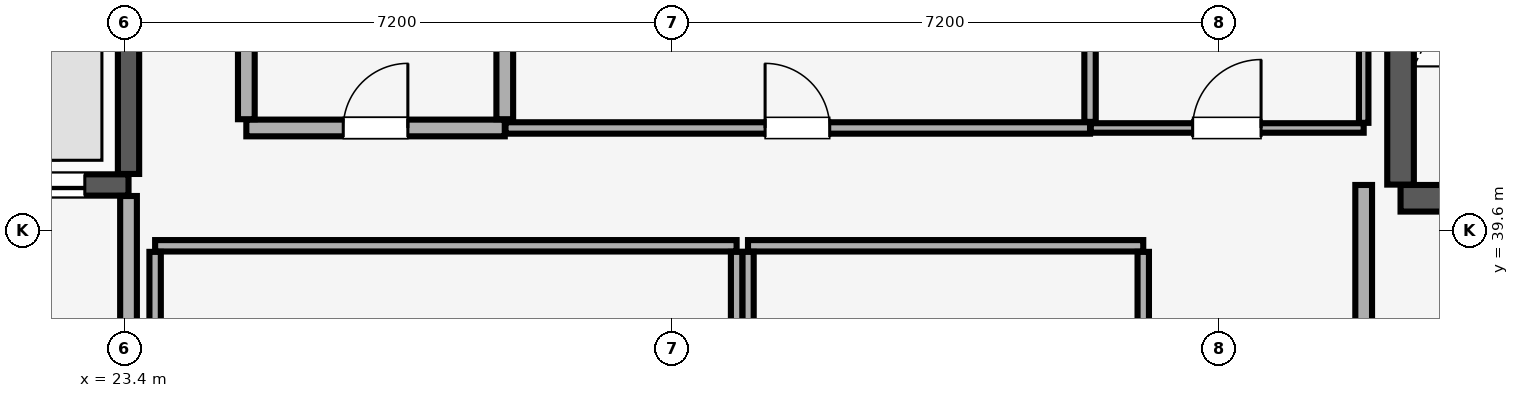
"""IFC4 building model, lengths in metres.
Left out: names, types, materials, properties, quantities, classifications, styles, units other than length and angle.
Written with IfcOpenShell. Run it as: python <this file> out.ifc"""

import sys

from ifc_helpers import new_model, si_unit, direction, frame, frame_2d, origin, place, context, subcontext, project, spatial, rectangle, extrude, element, fill, save


model = new_model("IFC4")
c1 = context("Model", 3, precision=1e-05, world=origin(), true_north=direction((0.0, 1.0)))
c2 = subcontext(c1, "Body", "Model", "MODEL_VIEW")
j1 = project(units=[si_unit("LENGTHUNIT", "METRE"), si_unit("PLANEANGLEUNIT", "RADIAN")], contexts=[c1])
p1 = place(None, origin())
s1 = spatial("IfcSite", under=j1, at=p1, CompositionType="ELEMENT")
p2 = place(p1, origin())
s2 = spatial("IfcBuilding", under=s1, at=p2, CompositionType="ELEMENT")
p3 = place(p2, frame((0.0, 0.0, 310.7)))
s3 = spatial("IfcBuildingStorey", under=s2, at=p3, CompositionType="ELEMENT", Elevation=310.7)
p4 = place(p3, frame((40.185, 40.025, 0.0), z_axis=(0.0, 0.0, 1.0), x_axis=(1.0, 0.0, 0.0)))
e1 = element("IfcWall", 1, at=p4, inside=s3, PredefinedType="SHEAR", context=c2, shape_type="SweptSolid", body=[
    extrude(rectangle(XDim=3.63, YDim=0.35, at=frame_2d((1.815, 0.0))), origin(), (0.0, 0.0, 1.0), 7.5),
])
p5 = place(p4, frame((1.24, 0.0, 0.0)))
e2 = element("IfcOpeningElement", 2, at=p5, cuts=e1, PredefinedType="OPENING", context=c2, shape_type="SweptSolid", body=[
    extrude(rectangle(XDim=1.15, YDim=2.15, at=frame_2d((0.575, 1.075))), frame((0.0, 0.185, 0.0), z_axis=(0.0, -1.0, 0.0), x_axis=(1.0, 0.0, 0.0)), (0.0, 0.0, 1.0), 0.37),
])
p6 = place(p3, frame((40.185, 40.205, 0.0), z_axis=(0.0, 0.0, 1.0), x_axis=(0.0, 1.0, 0.0)))
e3 = element("IfcWall", 3, at=p6, inside=s3, PredefinedType="SHEAR", context=c2, shape_type="SweptSolid", body=[
    extrude(rectangle(XDim=8.09, YDim=0.35, at=frame_2d((4.045, 0.0))), origin(), (0.0, 0.0, 1.0), 7.5),
])
p7 = place(p3, frame((21.035, 40.2, 0.0), z_axis=(0.0, 0.0, 1.0), x_axis=(1.0, 0.0, 0.0)))
e4 = element("IfcWall", 4, at=p7, inside=s3, PredefinedType="SHEAR", context=c2, shape_type="SweptSolid", body=[
    extrude(rectangle(XDim=2.415, YDim=0.28, at=frame_2d((1.208, 0.0))), origin(), (0.0, 0.0, 1.0), 7.5),
])
p8 = place(p7, frame((0.54, 0.0, 0.0)))
e5 = element("IfcOpeningElement", 5, at=p8, cuts=e4, PredefinedType="OPENING", context=c2, shape_type="SweptSolid", body=[
    extrude(rectangle(XDim=1.3, YDim=2.3, at=frame_2d((0.65, 1.15))), frame((0.0, 0.15, 0.0), z_axis=(0.0, -1.0, 0.0), x_axis=(1.0, 0.0, 0.0)), (0.0, 0.0, 1.0), 0.3),
])
p9 = place(p3, frame((23.45, 40.345, 0.0), z_axis=(0.0, 0.0, 1.0), x_axis=(0.0, 1.0, 0.0)))
e6 = element("IfcWall", 6, at=p9, inside=s3, PredefinedType="SHEAR", context=c2, shape_type="SweptSolid", body=[
    extrude(rectangle(XDim=2.81, YDim=0.28, at=frame_2d((1.405, 0.0))), origin(), (0.0, 0.0, 1.0), 7.5),
])
p10 = place(p3, frame((23.45, 34.415, 0.0), z_axis=(0.0, 0.0, 1.0), x_axis=(0.0, 1.0, 0.0)))
e7 = element("IfcWall", 7, at=p10, inside=s3, PredefinedType="PARTITIONING", context=c2, shape_type="SweptSolid", body=[
    extrude(rectangle(XDim=5.64, YDim=0.22, at=frame_2d((2.82, 0.0))), origin(), (0.0, 0.0, 1.0), 7.5),
])
p11 = place(p3, frame((39.7, 34.415, 0.0), z_axis=(0.0, 0.0, 1.0), x_axis=(0.0, 1.0, 0.0)))
e8 = element("IfcWall", 8, at=p11, inside=s3, PredefinedType="PARTITIONING", context=c2, shape_type="SweptSolid", body=[
    extrude(rectangle(XDim=5.785, YDim=0.22, at=frame_2d((2.893, 0.0))), origin(), (0.0, 0.0, 1.0), 7.5),
])
p12 = place(p3, frame((31.6, 39.4, 0.0), z_axis=(0.0, 0.0, 1.0), x_axis=(1.0, 0.0, 0.0)))
e9 = element("IfcWall", 9, at=p12, inside=s3, PredefinedType="PARTITIONING", context=c2, shape_type="SweptSolid", body=[
    extrude(rectangle(XDim=5.2, YDim=0.15, at=frame_2d((2.6, 0.0))), origin(), (0.0, 0.0, 1.0), 7.5),
])
for number, where, z_axis, x_axis in (
    (10, (31.6, 34.38, 0.0), (0.0, 0.0, 1.0), (0.0, 1.0, 0.0)),
    (11, (36.8, 34.38, 0.0), (0.0, 0.0, 1.0), (0.0, 1.0, 0.0)),
):
    element("IfcWall", number, at=place(p3, frame(where, z_axis=z_axis, x_axis=x_axis)), inside=s3, PredefinedType="PARTITIONING", context=c2, shape_type="SweptSolid", body=[
        extrude(rectangle(XDim=4.94, YDim=0.15, at=frame_2d((2.47, 0.0))), origin(), (0.0, 0.0, 1.0), 7.5),
    ])
p13 = place(p3, frame((23.8, 39.4, 0.0), z_axis=(0.0, 0.0, 1.0), x_axis=(1.0, 0.0, 0.0)))
e12 = element("IfcWall", 12, at=p13, inside=s3, PredefinedType="PARTITIONING", context=c2, shape_type="SweptSolid", body=[
    extrude(rectangle(XDim=7.65, YDim=0.15, at=frame_2d((3.825, 0.0))), origin(), (0.0, 0.0, 1.0), 7.5),
])
for number, where, z_axis, x_axis in (
    (13, (23.8, 34.38, 0.0), (0.0, 0.0, 1.0), (0.0, 1.0, 0.0)),
    (14, (31.45, 34.38, 0.0), (0.0, 0.0, 1.0), (0.0, 1.0, 0.0)),
):
    element("IfcWall", number, at=place(p3, frame(where, z_axis=z_axis, x_axis=x_axis)), inside=s3, PredefinedType="PARTITIONING", context=c2, shape_type="SweptSolid", body=[
        extrude(rectangle(XDim=4.94, YDim=0.15, at=frame_2d((2.47, 0.0))), origin(), (0.0, 0.0, 1.0), 7.5),
    ])
p14 = place(p3, frame((25.0, 40.95, 0.0), z_axis=(0.0, 0.0, 1.0), x_axis=(1.0, 0.0, 0.0)))
e15 = element("IfcWall", 15, at=p14, inside=s3, PredefinedType="PARTITIONING", context=c2, shape_type="SweptSolid", body=[
    extrude(rectangle(XDim=3.4, YDim=0.22, at=frame_2d((1.7, 0.0))), origin(), (0.0, 0.0, 1.0), 7.5),
])
p15 = place(p14, frame((1.275, 0.0, 0.0)))
e16 = element("IfcOpeningElement", 16, at=p15, cuts=e15, PredefinedType="OPENING", context=c2, shape_type="SweptSolid", body=[
    extrude(rectangle(XDim=0.85, YDim=2.1, at=frame_2d((0.425, 1.05))), frame((0.0, 0.12, 0.0), z_axis=(0.0, -1.0, 0.0), x_axis=(1.0, 0.0, 0.0)), (0.0, 0.0, 1.0), 0.24),
])
for number, where, z_axis, x_axis in (
    (17, (25.0, 41.065, 0.0), (0.0, 0.0, 1.0), (0.0, 1.0, 0.0)),
    (18, (28.4, 41.065, 0.0), (0.0, 0.0, 1.0), (0.0, 1.0, 0.0)),
):
    element("IfcWall", number, at=place(p3, frame(where, z_axis=z_axis, x_axis=x_axis)), inside=s3, PredefinedType="PARTITIONING", context=c2, shape_type="SweptSolid", body=[
        extrude(rectangle(XDim=7.785, YDim=0.22, at=frame_2d((3.893, 0.0))), origin(), (0.0, 0.0, 1.0), 7.5),
    ])
p16 = place(p3, frame((28.41, 40.95, 0.0), z_axis=(0.0, 0.0, 1.0), x_axis=(1.0, 0.0, 0.0)))
e19 = element("IfcWall", 19, at=p16, inside=s3, PredefinedType="PARTITIONING", context=c2, shape_type="SweptSolid", body=[
    extrude(rectangle(XDim=7.69, YDim=0.15, at=frame_2d((3.845, 0.0))), origin(), (0.0, 0.0, 1.0), 7.5),
])
p17 = place(p16, frame((3.415, 0.0, 0.0)))
e20 = element("IfcOpeningElement", 20, at=p17, cuts=e19, PredefinedType="OPENING", context=c2, shape_type="SweptSolid", body=[
    extrude(rectangle(XDim=0.85, YDim=2.1, at=frame_2d((0.425, 1.05))), frame((0.0, 0.085, 0.0), z_axis=(0.0, -1.0, 0.0), x_axis=(1.0, 0.0, 0.0)), (0.0, 0.0, 1.0), 0.17),
])
p18 = place(p3, frame((36.1, 41.03, 0.0), z_axis=(0.0, 0.0, 1.0), x_axis=(0.0, 1.0, 0.0)))
e21 = element("IfcWall", 21, at=p18, inside=s3, PredefinedType="PARTITIONING", context=c2, shape_type="SweptSolid", body=[
    extrude(rectangle(XDim=7.82, YDim=0.15, at=frame_2d((3.91, 0.0))), origin(), (0.0, 0.0, 1.0), 7.5),
])
p19 = place(p3, frame((36.11, 40.95, 0.0), z_axis=(0.0, 0.0, 1.0), x_axis=(1.0, 0.0, 0.0)))
e22 = element("IfcWall", 22, at=p19, inside=s3, PredefinedType="PARTITIONING", context=c2, shape_type="SweptSolid", body=[
    extrude(rectangle(XDim=3.59, YDim=0.125, at=frame_2d((1.795, 0.0))), origin(), (0.0, 0.0, 1.0), 7.5),
])
p20 = place(p19, frame((1.34, 0.0, 0.0)))
e23 = element("IfcOpeningElement", 23, at=p20, cuts=e22, PredefinedType="OPENING", context=c2, shape_type="SweptSolid", body=[
    extrude(rectangle(XDim=0.9, YDim=2.1, at=frame_2d((0.45, 1.05))), frame((0.0, 0.073, 0.0), z_axis=(0.0, -1.0, 0.0), x_axis=(1.0, 0.0, 0.0)), (0.0, 0.0, 1.0), 0.145),
])
p21 = place(p3, frame((39.7, 41.018, 0.0), z_axis=(0.0, 0.0, 1.0), x_axis=(0.0, 1.0, 0.0)))
e24 = element("IfcWall", 24, at=p21, inside=s3, PredefinedType="PARTITIONING", context=c2, shape_type="SweptSolid", body=[
    extrude(rectangle(XDim=3.715, YDim=0.125, at=frame_2d((1.857, 0.0))), origin(), (0.0, 0.0, 1.0), 7.5),
])
p22 = place(p8, origin())
e25 = element("IfcDoor", 25, at=p22, inside=s3, OperationType="DOUBLE_DOOR_SLIDING", PredefinedType="DOOR", context=c2, shape_type="SweptSolid", body=[
    extrude(rectangle(XDim=1.3, YDim=2.3, at=frame_2d((0.65, 1.15))), frame((0.0, 0.025, 0.0), z_axis=(0.0, -1.0, 0.0), x_axis=(1.0, 0.0, 0.0)), (0.0, 0.0, 1.0), 0.05),
])
fill(e5, e25)
p23 = place(p15, origin())
e26 = element("IfcDoor", 26, at=p23, inside=s3, OperationType="SINGLE_SWING_RIGHT", PredefinedType="DOOR", context=c2, shape_type="SweptSolid", body=[
    extrude(rectangle(XDim=0.85, YDim=2.1, at=frame_2d((0.425, 1.05))), frame((0.0, 0.025, 0.0), z_axis=(0.0, -1.0, 0.0), x_axis=(1.0, 0.0, 0.0)), (0.0, 0.0, 1.0), 0.05),
])
fill(e16, e26)
p24 = place(p17, origin())
e27 = element("IfcDoor", 27, at=p24, inside=s3, OperationType="SINGLE_SWING_LEFT", PredefinedType="DOOR", context=c2, shape_type="SweptSolid", body=[
    extrude(rectangle(XDim=0.85, YDim=2.1, at=frame_2d((0.425, 1.05))), frame((0.0, 0.025, 0.0), z_axis=(0.0, -1.0, 0.0), x_axis=(1.0, 0.0, 0.0)), (0.0, 0.0, 1.0), 0.05),
])
fill(e20, e27)
p25 = place(p20, origin())
e28 = element("IfcDoor", 28, at=p25, inside=s3, OperationType="SINGLE_SWING_RIGHT", PredefinedType="DOOR", context=c2, shape_type="SweptSolid", body=[
    extrude(rectangle(XDim=0.9, YDim=2.1, at=frame_2d((0.45, 1.05))), frame((0.0, 0.025, 0.0), z_axis=(0.0, -1.0, 0.0), x_axis=(1.0, 0.0, 0.0)), (0.0, 0.0, 1.0), 0.05),
])
fill(e23, e28)
save(model, sys.argv[1])
